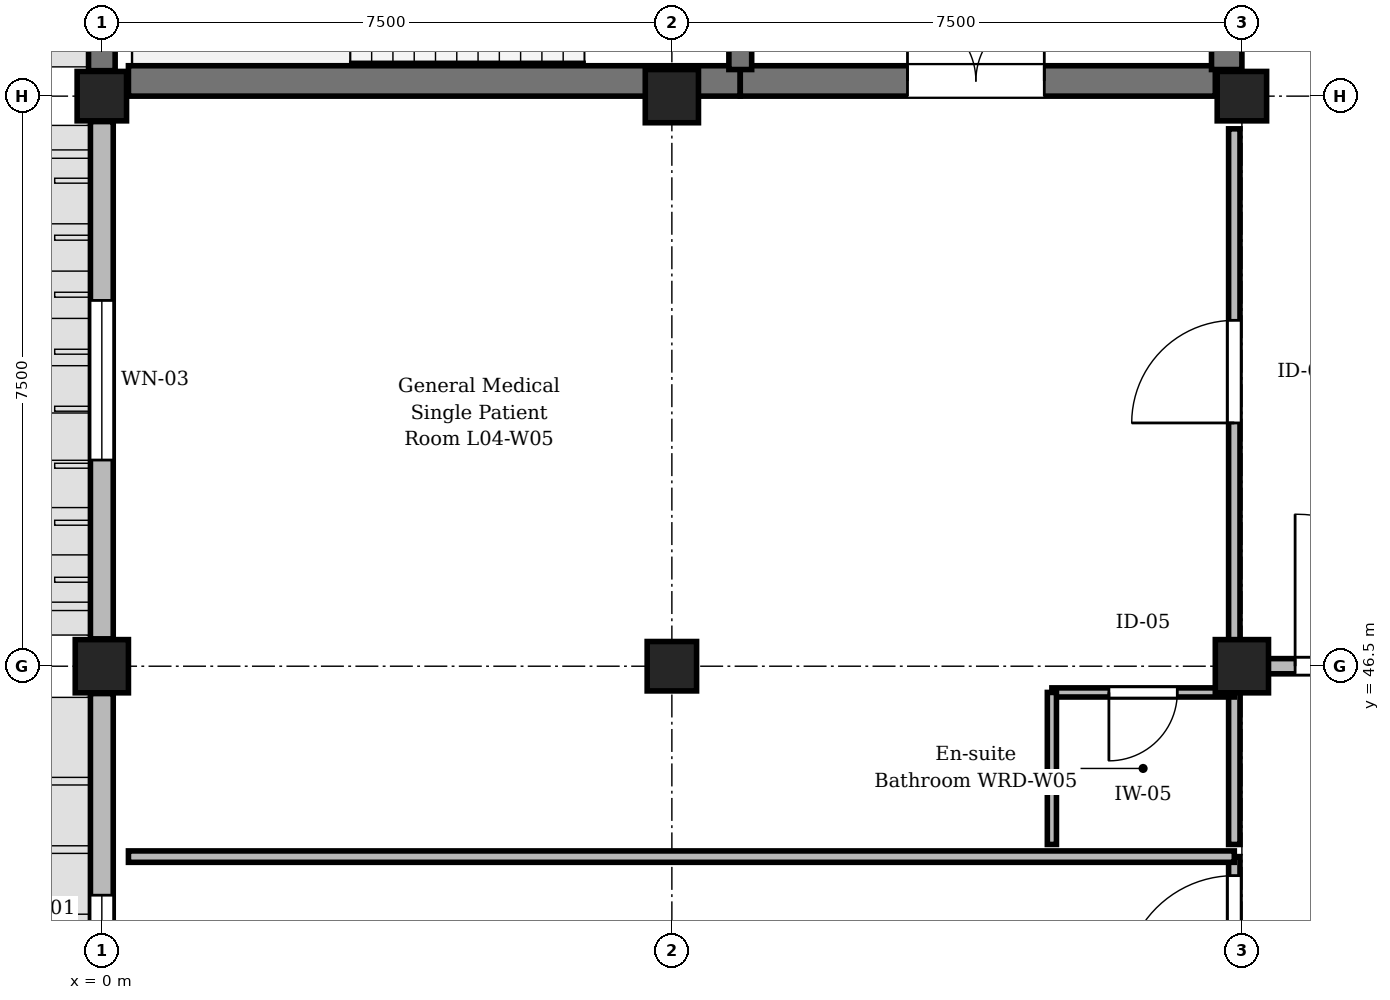
"""IFC4 building model, lengths in metres.
Left out: names, types, materials, properties, quantities, classifications, styles, units other than length and angle.
Written with IfcOpenShell. Run it as: python <this file> out.ifc"""

import sys

from ifc_helpers import new_model, si_unit, direction, frame, frame_2d, origin, origin_2d, place, context, subcontext, project, spatial, rectangle, extrude, element, fill, save


model = new_model("IFC4")
c1 = context("Model", 3, precision=1e-05, world=origin(), true_north=direction((0.0, 1.0)))
c2 = subcontext(c1, "Body", "Model", "MODEL_VIEW")
j1 = project(units=[si_unit("LENGTHUNIT", "METRE"), si_unit("PLANEANGLEUNIT", "RADIAN")], contexts=[c1])
p1 = place(None, origin())
s1 = spatial("IfcSite", under=j1, at=p1, CompositionType="ELEMENT")
p2 = place(p1, origin())
s2 = spatial("IfcBuilding", under=s1, at=p2, CompositionType="ELEMENT")
p3 = place(p2, frame((0.0, 0.0, 17.85)))
s3 = spatial("IfcBuildingStorey", under=s2, at=p3, CompositionType="ELEMENT", Elevation=17.85)
p4 = place(p3, frame((0.0, 46.5, 0.0), z_axis=(0.0, 0.0, 1.0), x_axis=(1.0, 0.0, 0.0)))
e1 = element("IfcColumn", 1, at=p4, inside=s3, PredefinedType="COLUMN", context=c2, shape_type="SweptSolid", body=[
    extrude(rectangle(XDim=0.7, YDim=0.7, at=origin_2d()), origin(), (0.0, 0.0, 1.0), 4.05),
])
for number, where, z_axis, x_axis in (
    (2, (0.0, 54.0, 0.0), (0.0, 0.0, 1.0), (1.0, 0.0, 0.0)),
    (3, (7.5, 46.5, 0.0), (0.0, 0.0, 1.0), (1.0, 0.0, 0.0)),
):
    element("IfcColumn", number, at=place(p3, frame(where, z_axis=z_axis, x_axis=x_axis)), inside=s3, PredefinedType="COLUMN", context=c2, shape_type="SweptSolid", body=[
        extrude(rectangle(XDim=0.65, YDim=0.65, at=origin_2d()), origin(), (0.0, 0.0, 1.0), 4.05),
    ])
for number, where, z_axis, x_axis in (
    (4, (7.5, 54.0, 0.0), (0.0, 0.0, 1.0), (1.0, 0.0, 0.0)),
    (5, (15.0, 46.5, 0.0), (0.0, 0.0, 1.0), (1.0, 0.0, 0.0)),
):
    element("IfcColumn", number, at=place(p3, frame(where, z_axis=z_axis, x_axis=x_axis)), inside=s3, PredefinedType="COLUMN", context=c2, shape_type="SweptSolid", body=[
        extrude(rectangle(XDim=0.7, YDim=0.7, at=origin_2d()), origin(), (0.0, 0.0, 1.0), 4.05),
    ])
p5 = place(p3, frame((15.0, 54.0, 0.0), z_axis=(0.0, 0.0, 1.0), x_axis=(1.0, 0.0, 0.0)))
e6 = element("IfcColumn", 6, at=p5, inside=s3, PredefinedType="COLUMN", context=c2, shape_type="SweptSolid", body=[
    extrude(rectangle(XDim=0.65, YDim=0.65, at=origin_2d()), origin(), (0.0, 0.0, 1.0), 4.05),
])
p6 = place(p3, frame((0.0, 39.335, 0.0), z_axis=(0.0, 0.0, 1.0), x_axis=(0.0, 1.0, 0.0)))
e7 = element("IfcWall", 7, at=p6, inside=s3, PredefinedType="STANDARD", context=c2, shape_type="SweptSolid", body=[
    extrude(rectangle(XDim=6.805, YDim=0.3, at=frame_2d((3.402, 0.0))), origin(), (0.0, 0.0, 1.0), 3.17),
])
p7 = place(p6, frame((2.653, 0.0, 0.9)))
e8 = element("IfcOpeningElement", 8, at=p7, cuts=e7, PredefinedType="OPENING", context=c2, shape_type="SweptSolid", body=[
    extrude(rectangle(XDim=1.5, YDim=1.99, at=frame_2d((0.75, 0.995))), frame((0.0, 0.16, 0.0), z_axis=(0.0, -1.0, 0.0), x_axis=(1.0, 0.0, 0.0)), (0.0, 0.0, 1.0), 0.32),
])
p8 = place(p3, frame((0.0, 46.86, 0.0), z_axis=(0.0, 0.0, 1.0), x_axis=(0.0, 1.0, 0.0)))
e9 = element("IfcWall", 9, at=p8, inside=s3, PredefinedType="STANDARD", context=c2, shape_type="SweptSolid", body=[
    extrude(rectangle(XDim=6.805, YDim=0.3, at=frame_2d((3.402, 0.0))), origin(), (0.0, 0.0, 1.0), 3.17),
])
p9 = place(p8, frame((2.353, 0.0, 0.9)))
e10 = element("IfcOpeningElement", 10, at=p9, cuts=e9, PredefinedType="OPENING", context=c2, shape_type="SweptSolid", body=[
    extrude(rectangle(XDim=2.1, YDim=1.99, at=frame_2d((1.05, 0.995))), frame((0.0, 0.16, 0.0), z_axis=(0.0, -1.0, 0.0), x_axis=(1.0, 0.0, 0.0)), (0.0, 0.0, 1.0), 0.32),
])
p10 = place(p3, frame((0.0, 54.335, 0.0), z_axis=(0.0, 0.0, 1.0), x_axis=(0.0, 1.0, 0.0)))
e11 = element("IfcWall", 11, at=p10, inside=s3, PredefinedType="SHEAR", context=c2, shape_type="SweptSolid", body=[
    extrude(rectangle(XDim=6.805, YDim=0.35, at=frame_2d((3.402, 0.0))), origin(), (0.0, 0.0, 1.0), 3.77),
])
p11 = place(p3, frame((0.35, 54.2, 0.0), z_axis=(0.0, 0.0, 1.0), x_axis=(1.0, 0.0, 0.0)))
e12 = element("IfcWall", 12, at=p11, inside=s3, PredefinedType="SHEAR", context=c2, shape_type="SweptSolid", body=[
    extrude(rectangle(XDim=8.05, YDim=0.4, at=frame_2d((4.025, 0.0))), origin(), (0.0, 0.0, 1.0), 3.77),
])
p12 = place(p3, frame((8.4, 54.2, 0.0), z_axis=(0.0, 0.0, 1.0), x_axis=(1.0, 0.0, 0.0)))
e13 = element("IfcWall", 13, at=p12, inside=s3, PredefinedType="SHEAR", context=c2, shape_type="SweptSolid", body=[
    extrude(rectangle(XDim=6.25, YDim=0.4, at=frame_2d((3.125, 0.0))), origin(), (0.0, 0.0, 1.0), 3.77),
])
p13 = place(p12, frame((2.2, 0.0, 0.0)))
e14 = element("IfcOpeningElement", 14, at=p13, cuts=e13, PredefinedType="OPENING", context=c2, shape_type="SweptSolid", body=[
    extrude(rectangle(XDim=1.8, YDim=2.25, at=frame_2d((0.9, 1.125))), frame((0.0, 0.21, 0.0), z_axis=(0.0, -1.0, 0.0), x_axis=(1.0, 0.0, 0.0)), (0.0, 0.0, 1.0), 0.42),
])
p14 = place(p3, frame((14.8, 54.35, 0.0), z_axis=(0.0, 0.0, 1.0), x_axis=(0.0, 1.0, 0.0)))
e15 = element("IfcWall", 15, at=p14, inside=s3, PredefinedType="SHEAR", context=c2, shape_type="SweptSolid", body=[
    extrude(rectangle(XDim=3.75, YDim=0.4, at=frame_2d((1.875, 0.0))), origin(), (0.0, 0.0, 1.0), 3.77),
])
p15 = place(p3, frame((8.4, 58.0, 0.0), z_axis=(0.0, 0.0, 1.0), x_axis=(0.0, -1.0, 0.0)))
e16 = element("IfcWall", 16, at=p15, inside=s3, PredefinedType="SHEAR", context=c2, shape_type="SweptSolid", body=[
    extrude(rectangle(XDim=3.65, YDim=0.3, at=frame_2d((1.825, 0.0))), origin(), (0.0, 0.0, 1.0), 3.77),
])
p16 = place(p15, frame((1.22, 0.0, 0.0)))
e17 = element("IfcOpeningElement", 17, at=p16, cuts=e16, PredefinedType="OPENING", context=c2, shape_type="SweptSolid", body=[
    extrude(rectangle(XDim=1.2, YDim=2.25, at=frame_2d((0.6, 1.125))), frame((0.0, 0.16, 0.0), z_axis=(0.0, -1.0, 0.0), x_axis=(1.0, 0.0, 0.0)), (0.0, 0.0, 1.0), 0.32),
])
p17 = place(p3, frame((14.9, 34.58, 0.0), z_axis=(0.0, 0.0, 1.0), x_axis=(0.0, 1.0, 0.0)))
e18 = element("IfcWall", 18, at=p17, inside=s3, PredefinedType="PARTITIONING", context=c2, shape_type="SweptSolid", body=[
    extrude(rectangle(XDim=9.415, YDim=0.15, at=frame_2d((4.708, 0.0))), origin(), (0.0, 0.0, 1.0), 3.205),
])
p18 = place(p17, frame((7.715, 0.0, 0.0)))
e19 = element("IfcOpeningElement", 19, at=p18, cuts=e18, PredefinedType="OPENING", context=c2, shape_type="SweptSolid", body=[
    extrude(rectangle(XDim=1.45, YDim=2.3, at=frame_2d((0.725, 1.15))), frame((0.0, 0.085, 0.0), z_axis=(0.0, -1.0, 0.0), x_axis=(1.0, 0.0, 0.0)), (0.0, 0.0, 1.0), 0.17),
])
p19 = place(p3, frame((14.9, 44.155, 0.0), z_axis=(0.0, 0.0, 1.0), x_axis=(0.0, 1.0, 0.0)))
e20 = element("IfcWall", 20, at=p19, inside=s3, PredefinedType="PARTITIONING", context=c2, shape_type="SweptSolid", body=[
    extrude(rectangle(XDim=9.415, YDim=0.15, at=frame_2d((4.708, 0.0))), origin(), (0.0, 0.0, 1.0), 3.205),
])
p20 = place(p19, frame((5.545, 0.0, 0.0)))
e21 = element("IfcOpeningElement", 21, at=p20, cuts=e20, PredefinedType="OPENING", context=c2, shape_type="SweptSolid", body=[
    extrude(rectangle(XDim=1.35, YDim=2.25, at=frame_2d((0.675, 1.125))), frame((0.0, 0.085, 0.0), z_axis=(0.0, -1.0, 0.0), x_axis=(1.0, 0.0, 0.0)), (0.0, 0.0, 1.0), 0.17),
])
p21 = place(p3, frame((14.9, 46.155, 0.0), z_axis=(0.0, 0.0, 1.0), x_axis=(-1.0, 0.0, 0.0)))
e22 = element("IfcWall", 22, at=p21, inside=s3, PredefinedType="PARTITIONING", context=c2, shape_type="SweptSolid", body=[
    extrude(rectangle(XDim=2.4, YDim=0.12, at=frame_2d((1.2, 0.0))), origin(), (0.0, 0.0, 1.0), 3.205),
])
p22 = place(p21, frame((0.75, 0.0, 0.0)))
e23 = element("IfcOpeningElement", 23, at=p22, cuts=e22, PredefinedType="OPENING", context=c2, shape_type="SweptSolid", body=[
    extrude(rectangle(XDim=0.9, YDim=2.1, at=frame_2d((0.45, 1.05))), frame((0.0, 0.07, 0.0), z_axis=(0.0, -1.0, 0.0), x_axis=(1.0, 0.0, 0.0)), (0.0, 0.0, 1.0), 0.14),
])
p23 = place(p3, frame((12.5, 44.155, 0.0), z_axis=(0.0, 0.0, 1.0), x_axis=(0.0, 1.0, 0.0)))
e24 = element("IfcWall", 24, at=p23, inside=s3, PredefinedType="PARTITIONING", context=c2, shape_type="SweptSolid", body=[
    extrude(rectangle(XDim=2.0, YDim=0.12, at=frame_2d((1.0, 0.0))), origin(), (0.0, 0.0, 1.0), 3.755),
])
p24 = place(p3, frame((0.35, 43.995, 0.0), z_axis=(0.0, 0.0, 1.0), x_axis=(1.0, 0.0, 0.0)))
e25 = element("IfcWall", 25, at=p24, inside=s3, PredefinedType="PARTITIONING", context=c2, shape_type="SweptSolid", body=[
    extrude(rectangle(XDim=14.55, YDim=0.15, at=frame_2d((7.275, 0.0))), origin(), (0.0, 0.0, 1.0), 3.755),
])
p25 = place(p3, frame((15.2, 46.5, 0.0), z_axis=(0.0, 0.0, 1.0), x_axis=(1.0, 0.0, 0.0)))
e26 = element("IfcWall", 26, at=p25, inside=s3, PredefinedType="STANDARD", context=c2, shape_type="SweptSolid", body=[
    extrude(rectangle(XDim=3.0, YDim=0.2, at=frame_2d((1.5, 0.0))), origin(), (0.0, 0.0, 1.0), 3.155),
])
p26 = place(p25, frame((0.5, 0.0, 0.0)))
e27 = element("IfcOpeningElement", 27, at=p26, cuts=e26, PredefinedType="OPENING", context=c2, shape_type="SweptSolid", body=[
    extrude(rectangle(XDim=2.0, YDim=2.3, at=frame_2d((1.0, 1.15))), frame((0.0, 0.11, 0.0), z_axis=(0.0, -1.0, 0.0), x_axis=(1.0, 0.0, 0.0)), (0.0, 0.0, 1.0), 0.22),
])
p27 = place(p7, origin())
e28 = element("IfcWindow", 28, at=p27, inside=s3, PartitioningType="SINGLE_PANEL", PredefinedType="WINDOW", context=c2, shape_type="SweptSolid", body=[
    extrude(rectangle(XDim=1.5, YDim=1.99, at=frame_2d((0.75, 0.995))), frame((0.0, 0.03, 0.0), z_axis=(0.0, -1.0, 0.0), x_axis=(1.0, 0.0, 0.0)), (0.0, 0.0, 1.0), 0.06),
])
fill(e8, e28)
p28 = place(p9, origin())
e29 = element("IfcWindow", 29, at=p28, inside=s3, PartitioningType="SINGLE_PANEL", PredefinedType="WINDOW", context=c2, shape_type="SweptSolid", body=[
    extrude(rectangle(XDim=2.1, YDim=1.99, at=frame_2d((1.05, 0.995))), frame((0.0, 0.03, 0.0), z_axis=(0.0, -1.0, 0.0), x_axis=(1.0, 0.0, 0.0)), (0.0, 0.0, 1.0), 0.06),
])
fill(e10, e29)
p29 = place(p13, origin())
e30 = element("IfcDoor", 30, at=p29, inside=s3, OperationType="DOUBLE_DOOR_SINGLE_SWING", PredefinedType="DOOR", context=c2, shape_type="SweptSolid", body=[
    extrude(rectangle(XDim=1.8, YDim=2.25, at=frame_2d((0.9, 1.125))), frame((0.0, 0.025, 0.0), z_axis=(0.0, -1.0, 0.0), x_axis=(1.0, 0.0, 0.0)), (0.0, 0.0, 1.0), 0.05),
])
fill(e14, e30)
p30 = place(p18, origin())
e31 = element("IfcDoor", 31, at=p30, inside=s3, OperationType="SINGLE_SWING_LEFT", PredefinedType="DOOR", context=c2, shape_type="SweptSolid", body=[
    extrude(rectangle(XDim=1.45, YDim=2.3, at=frame_2d((0.725, 1.15))), frame((0.0, 0.025, 0.0), z_axis=(0.0, -1.0, 0.0), x_axis=(1.0, 0.0, 0.0)), (0.0, 0.0, 1.0), 0.05),
])
fill(e19, e31)
p31 = place(p20, origin())
e32 = element("IfcDoor", 32, at=p31, inside=s3, OperationType="SINGLE_SWING_LEFT", PredefinedType="DOOR", context=c2, shape_type="SweptSolid", body=[
    extrude(rectangle(XDim=1.35, YDim=2.25, at=frame_2d((0.675, 1.125))), frame((0.0, 0.025, 0.0), z_axis=(0.0, -1.0, 0.0), x_axis=(1.0, 0.0, 0.0)), (0.0, 0.0, 1.0), 0.05),
])
fill(e21, e32)
p32 = place(p22, origin())
e33 = element("IfcDoor", 33, at=p32, inside=s3, OperationType="SINGLE_SWING_RIGHT", PredefinedType="DOOR", context=c2, shape_type="SweptSolid", body=[
    extrude(rectangle(XDim=0.9, YDim=2.1, at=frame_2d((0.45, 1.05))), frame((0.0, 0.025, 0.0), z_axis=(0.0, -1.0, 0.0), x_axis=(1.0, 0.0, 0.0)), (0.0, 0.0, 1.0), 0.05),
])
fill(e23, e33)
p33 = place(p26, origin())
e34 = element("IfcDoor", 34, at=p33, inside=s3, OperationType="DOUBLE_DOOR_SINGLE_SWING", PredefinedType="DOOR", context=c2, shape_type="SweptSolid", body=[
    extrude(rectangle(XDim=2.0, YDim=2.3, at=frame_2d((1.0, 1.15))), frame((0.0, 0.025, 0.0), z_axis=(0.0, -1.0, 0.0), x_axis=(1.0, 0.0, 0.0)), (0.0, 0.0, 1.0), 0.05),
])
fill(e27, e34)
save(model, sys.argv[1])
